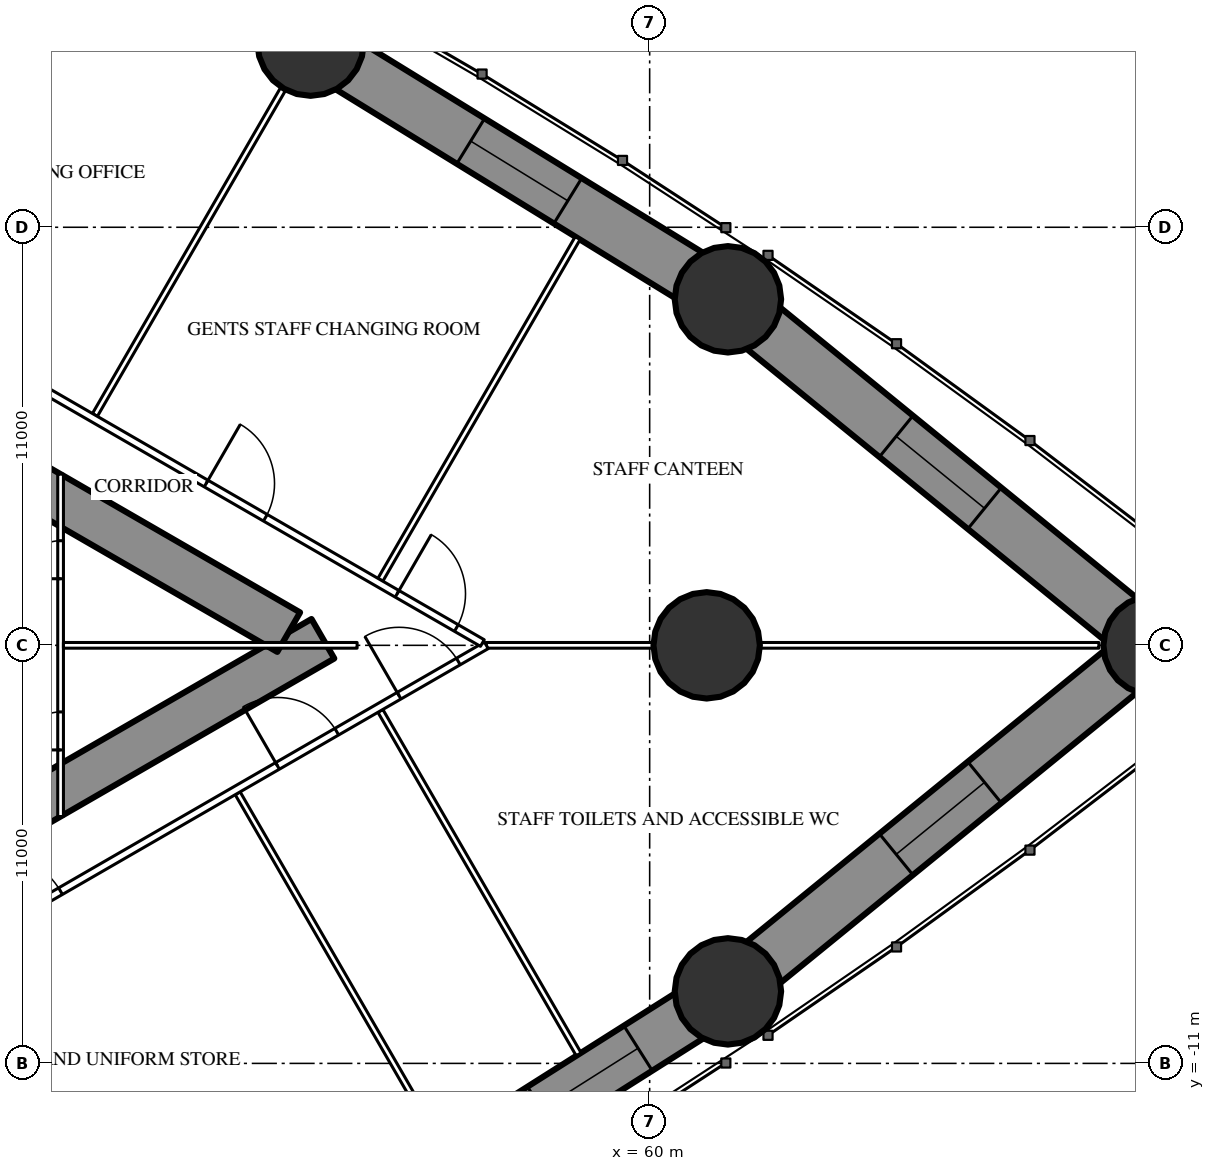
"""IFC4 building model, lengths in metres.
Left out: names, types, materials, properties, quantities, classifications, styles, units other than length and angle.
Written with IfcOpenShell. Run it as: python <this file> out.ifc"""

import sys

from ifc_helpers import new_model, si_unit, direction, frame, frame_2d, origin, origin_2d, place, context, subcontext, project, spatial, rectangle, hollow_circle, extrude, element, fill, save


model = new_model("IFC4")
c1 = context("Model", 3, precision=1e-05, world=origin(), true_north=direction((0.0, 1.0)))
c2 = subcontext(c1, "Body", "Model", "MODEL_VIEW")
j1 = project(units=[si_unit("LENGTHUNIT", "METRE"), si_unit("PLANEANGLEUNIT", "RADIAN")], contexts=[c1])
p1 = place(None, origin())
s1 = spatial("IfcSite", under=j1, at=p1, CompositionType="ELEMENT")
p2 = place(p1, origin())
s2 = spatial("IfcBuilding", under=s1, at=p2, CompositionType="ELEMENT")
p3 = place(p2, frame((0.0, 0.0, 77.5)))
s3 = spatial("IfcBuildingStorey", under=s2, at=p3, CompositionType="ELEMENT", Elevation=77.5)
p4 = place(p3, frame((73.239, 0.0, 0.0), z_axis=(0.0, 0.0, 1.0), x_axis=(1.0, 0.0, 0.0)))
e1 = element("IfcColumn", 1, at=p4, inside=s3, PredefinedType="COLUMN", context=c2, shape_type="SweptSolid", body=[
    extrude(hollow_circle(Radius=1.3, WallThickness=0.1, at=origin_2d()), origin(), (0.0, 0.0, 1.0), 3.5),
])
for number, where, z_axis, x_axis in (
    (2, (62.059, 9.105, 0.0), (0.0, 0.0, 1.0), (1.0, 0.0, 0.0)),
    (3, (51.078, 15.858, 0.0), (0.0, 0.0, 1.0), (1.0, 0.0, 0.0)),
    (4, (62.059, -9.105, 0.0), (0.0, 0.0, 1.0), (1.0, 0.0, 0.0)),
):
    element("IfcColumn", number, at=place(p3, frame(where, z_axis=z_axis, x_axis=x_axis)), inside=s3, PredefinedType="COLUMN", context=c2, shape_type="SweptSolid", body=[
        extrude(hollow_circle(Radius=1.4, WallThickness=0.12, at=origin_2d()), origin(), (0.0, 0.0, 1.0), 3.5),
    ])
p5 = place(p3, frame((61.5, 0.0, 0.0), z_axis=(0.0, 0.0, 1.0), x_axis=(1.0, 0.0, 0.0)))
e5 = element("IfcColumn", 5, at=p5, inside=s3, PredefinedType="COLUMN", context=c2, shape_type="SweptSolid", body=[
    extrude(hollow_circle(Radius=1.4, WallThickness=0.1, at=origin_2d()), origin(), (0.0, 0.0, 1.0), 3.5),
])
p6 = place(p3, frame((27.2, -13.8, 0.0), z_axis=(0.0, 0.0, 1.0), x_axis=(0.866027159892, 0.499996958321, 0.0)))
e6 = element("IfcWall", 6, at=p6, inside=s3, PredefinedType="SHEAR", context=c2, shape_type="SweptSolid", body=[
    extrude(rectangle(XDim=27.947, YDim=1.2, at=frame_2d((13.973, 0.0))), origin(), (0.0, 0.0, 1.0), 3.5),
])
p7 = place(p6, frame((5.65, 0.0, 0.0)))
e7 = element("IfcOpeningElement", 7, at=p7, cuts=e6, PredefinedType="OPENING", context=c2, shape_type="SweptSolid", body=[
    extrude(rectangle(XDim=1.0, YDim=2.2, at=frame_2d((0.5, 1.1))), frame((0.0, 0.61, 0.0), z_axis=(0.0, -1.0, 0.0), x_axis=(1.0, 0.0, 0.0)), (0.0, 0.0, 1.0), 1.22),
])
p8 = place(p6, frame((14.045, 0.0, 0.0)))
e8 = element("IfcOpeningElement", 8, at=p8, cuts=e6, PredefinedType="OPENING", context=c2, shape_type="SweptSolid", body=[
    extrude(rectangle(XDim=1.8, YDim=2.2, at=frame_2d((0.9, 1.1))), frame((0.0, 0.61, 0.0), z_axis=(0.0, -1.0, 0.0), x_axis=(1.0, 0.0, 0.0)), (0.0, 0.0, 1.0), 1.22),
])
p9 = place(p3, frame((27.2, 13.8, 0.0), z_axis=(0.0, 0.0, 1.0), x_axis=(0.866024515034, -0.500001539357, 0.0)))
e9 = element("IfcWall", 9, at=p9, inside=s3, PredefinedType="SHEAR", context=c2, shape_type="SweptSolid", body=[
    extrude(rectangle(XDim=26.907, YDim=1.2, at=frame_2d((13.454, 0.0))), origin(), (0.0, 0.0, 1.0), 3.5),
])
p10 = place(p9, frame((4.5, 0.0, 0.0)))
e10 = element("IfcOpeningElement", 10, at=p10, cuts=e9, PredefinedType="OPENING", context=c2, shape_type="SweptSolid", body=[
    extrude(rectangle(XDim=1.0, YDim=2.2, at=frame_2d((0.5, 1.1))), frame((0.0, 0.61, 0.0), z_axis=(0.0, -1.0, 0.0), x_axis=(1.0, 0.0, 0.0)), (0.0, 0.0, 1.0), 1.22),
])
p11 = place(p9, frame((12.545, 0.0, 0.0)))
e11 = element("IfcOpeningElement", 11, at=p11, cuts=e9, PredefinedType="OPENING", context=c2, shape_type="SweptSolid", body=[
    extrude(rectangle(XDim=1.8, YDim=2.2, at=frame_2d((0.9, 1.1))), frame((0.0, 0.61, 0.0), z_axis=(0.0, -1.0, 0.0), x_axis=(1.0, 0.0, 0.0)), (0.0, 0.0, 1.0), 1.22),
])
p12 = place(p3, frame((54.795, -13.701, 0.0), z_axis=(0.0, 0.0, 1.0), x_axis=(0.845078312276, 0.534642540508, 0.0)))
e12 = element("IfcWall", 12, at=p12, inside=s3, PredefinedType="SHEAR", context=c2, shape_type="SweptSolid", body=[
    extrude(rectangle(XDim=8.596, YDim=1.4, at=frame_2d((4.298, 0.0))), origin(), (0.0, 0.0, 1.0), 3.5),
])
p13 = place(p12, frame((2.798, 0.0, 0.6)))
e13 = element("IfcOpeningElement", 13, at=p13, cuts=e12, PredefinedType="OPENING", context=c2, shape_type="SweptSolid", body=[
    extrude(rectangle(XDim=3.0, YDim=1.2, at=frame_2d((1.5, 0.6))), frame((0.0, 0.71, 0.0), z_axis=(0.0, -1.0, 0.0), x_axis=(1.0, 0.0, 0.0)), (0.0, 0.0, 1.0), 1.42),
])
p14 = place(p3, frame((62.059, -9.105, 0.0), z_axis=(0.0, 0.0, 1.0), x_axis=(0.775390970005, 0.631481467372, 0.0)))
e14 = element("IfcWall", 14, at=p14, inside=s3, PredefinedType="SHEAR", context=c2, shape_type="SweptSolid", body=[
    extrude(rectangle(XDim=14.418, YDim=1.4, at=frame_2d((7.209, 0.0))), origin(), (0.0, 0.0, 1.0), 3.5),
])
p15 = place(p14, frame((5.709, 0.0, 0.6)))
e15 = element("IfcOpeningElement", 15, at=p15, cuts=e14, PredefinedType="OPENING", context=c2, shape_type="SweptSolid", body=[
    extrude(rectangle(XDim=3.0, YDim=1.2, at=frame_2d((1.5, 0.6))), frame((0.0, 0.71, 0.0), z_axis=(0.0, -1.0, 0.0), x_axis=(1.0, 0.0, 0.0)), (0.0, 0.0, 1.0), 1.42),
])
p16 = place(p3, frame((73.239, 0.0, 0.0), z_axis=(0.0, 0.0, 1.0), x_axis=(-0.775390970005, 0.631481467372, 0.0)))
e16 = element("IfcWall", 16, at=p16, inside=s3, PredefinedType="SHEAR", context=c2, shape_type="SweptSolid", body=[
    extrude(rectangle(XDim=14.418, YDim=1.4, at=frame_2d((7.209, 0.0))), origin(), (0.0, 0.0, 1.0), 3.5),
])
p17 = place(p16, frame((5.709, 0.0, 0.6)))
e17 = element("IfcOpeningElement", 17, at=p17, cuts=e16, PredefinedType="OPENING", context=c2, shape_type="SweptSolid", body=[
    extrude(rectangle(XDim=3.0, YDim=1.2, at=frame_2d((1.5, 0.6))), frame((0.0, 0.71, 0.0), z_axis=(0.0, -1.0, 0.0), x_axis=(1.0, 0.0, 0.0)), (0.0, 0.0, 1.0), 1.42),
])
p18 = place(p3, frame((62.059, 9.105, 0.0), z_axis=(0.0, 0.0, 1.0), x_axis=(-0.851815628025, 0.523841708775, 0.0)))
e18 = element("IfcWall", 18, at=p18, inside=s3, PredefinedType="SHEAR", context=c2, shape_type="SweptSolid", body=[
    extrude(rectangle(XDim=12.892, YDim=1.4, at=frame_2d((6.446, 0.0))), origin(), (0.0, 0.0, 1.0), 3.5),
])
p19 = place(p18, frame((4.946, 0.0, 0.6)))
e19 = element("IfcOpeningElement", 19, at=p19, cuts=e18, PredefinedType="OPENING", context=c2, shape_type="SweptSolid", body=[
    extrude(rectangle(XDim=3.0, YDim=1.2, at=frame_2d((1.5, 0.6))), frame((0.0, 0.71, 0.0), z_axis=(0.0, -1.0, 0.0), x_axis=(1.0, 0.0, 0.0)), (0.0, 0.0, 1.0), 1.42),
])
p20 = place(p3, frame((51.078, 15.858, 0.0), z_axis=(0.0, 0.0, 1.0), x_axis=(-0.883403493655, 0.46861313191, 0.0)))
e20 = element("IfcWall", 20, at=p20, inside=s3, PredefinedType="SHEAR", context=c2, shape_type="SweptSolid", body=[
    extrude(rectangle(XDim=8.596, YDim=1.4, at=frame_2d((4.298, 0.0))), origin(), (0.0, 0.0, 1.0), 3.5),
])
p21 = place(p20, frame((2.798, 0.0, 0.6)))
e21 = element("IfcOpeningElement", 21, at=p21, cuts=e20, PredefinedType="OPENING", context=c2, shape_type="SweptSolid", body=[
    extrude(rectangle(XDim=3.0, YDim=1.2, at=frame_2d((1.5, 0.6))), frame((0.0, 0.71, 0.0), z_axis=(0.0, -1.0, 0.0), x_axis=(1.0, 0.0, 0.0)), (0.0, 0.0, 1.0), 1.42),
])
p22 = place(p3, frame((49.159, -3.893, 0.0), z_axis=(0.0, 0.0, 1.0), x_axis=(0.499998773722, -0.866026111775, 0.0)))
e22 = element("IfcWall", 22, at=p22, inside=s3, PredefinedType="PARTITIONING", context=c2, shape_type="SweptSolid", body=[
    extrude(rectangle(XDim=9.892, YDim=0.15, at=frame_2d((4.946, 0.0))), origin(), (0.0, 0.0, 1.0), 2.05),
])
p23 = place(p3, frame((52.915, -1.725, 0.0), z_axis=(0.0, 0.0, 1.0), x_axis=(0.499991830914, -0.866030120157, 0.0)))
e23 = element("IfcWall", 23, at=p23, inside=s3, PredefinedType="PARTITIONING", context=c2, shape_type="SweptSolid", body=[
    extrude(rectangle(XDim=10.434, YDim=0.15, at=frame_2d((5.217, 0.0))), origin(), (0.0, 0.0, 1.0), 3.25),
])
p24 = place(p3, frame((45.403, 6.062, 0.0), z_axis=(0.0, 0.0, 1.0), x_axis=(0.500013434677, 0.866017647131, 0.0)))
e24 = element("IfcWall", 24, at=p24, inside=s3, PredefinedType="PARTITIONING", context=c2, shape_type="SweptSolid", body=[
    extrude(rectangle(XDim=9.902, YDim=0.15, at=frame_2d((4.951, 0.0))), origin(), (0.0, 0.0, 1.0), 2.05),
])
p25 = place(p3, frame((52.915, 1.725, 0.0), z_axis=(0.0, 0.0, 1.0), x_axis=(0.499986436127, 0.866033234748, 0.0)))
e25 = element("IfcWall", 25, at=p25, inside=s3, PredefinedType="PARTITIONING", context=c2, shape_type="SweptSolid", body=[
    extrude(rectangle(XDim=10.381, YDim=0.15, at=frame_2d((5.19, 0.0))), origin(), (0.0, 0.0, 1.0), 3.25),
])
p26 = place(p3, frame((55.702, 0.0, 0.0), z_axis=(0.0, 0.0, 1.0), x_axis=(1.0, 0.0, 0.0)))
e26 = element("IfcWall", 26, at=p26, inside=s3, PredefinedType="PARTITIONING", context=c2, shape_type="SweptSolid", body=[
    extrude(rectangle(XDim=16.117, YDim=0.15, at=frame_2d((8.059, 0.0))), origin(), (0.0, 0.0, 1.0), 2.05),
])
p27 = place(p3, frame((37.96, -10.243, 0.0), z_axis=(0.0, 0.0, 1.0), x_axis=(0.866026429433, 0.499998223521, 0.0)))
e27 = element("IfcWall", 27, at=p27, inside=s3, PredefinedType="PARTITIONING", context=c2, shape_type="SweptSolid", body=[
    extrude(rectangle(XDim=20.487, YDim=0.2, at=frame_2d((10.243, 0.0))), origin(), (0.0, 0.0, 1.0), 3.25),
])
p28 = place(p27, frame((14.142, 0.0, 0.0)))
e28 = element("IfcOpeningElement", 28, at=p28, cuts=e27, PredefinedType="OPENING", context=c2, shape_type="SweptSolid", body=[
    extrude(rectangle(XDim=1.8, YDim=2.2, at=frame_2d((0.9, 1.1))), frame((0.0, 0.11, 0.0), z_axis=(0.0, -1.0, 0.0), x_axis=(1.0, 0.0, 0.0)), (0.0, 0.0, 1.0), 0.22),
])
p29 = place(p27, frame((17.836, 0.0, 0.0)))
e29 = element("IfcOpeningElement", 29, at=p29, cuts=e27, PredefinedType="OPENING", context=c2, shape_type="SweptSolid", body=[
    extrude(rectangle(XDim=1.8, YDim=2.04, at=frame_2d((0.9, 1.02))), frame((0.0, 0.11, 0.0), z_axis=(0.0, -1.0, 0.0), x_axis=(1.0, 0.0, 0.0)), (0.0, 0.0, 1.0), 0.22),
])
p30 = place(p27, frame((5.55, 0.0, 0.0)))
e30 = element("IfcOpeningElement", 30, at=p30, cuts=e27, PredefinedType="OPENING", context=c2, shape_type="SweptSolid", body=[
    extrude(rectangle(XDim=2.0, YDim=2.4, at=frame_2d((1.0, 1.2))), frame((0.0, 0.11, 0.0), z_axis=(0.0, -1.0, 0.0), x_axis=(1.0, 0.0, 0.0)), (0.0, 0.0, 1.0), 0.22),
])
p31 = place(p3, frame((36.834, 10.894, 0.0), z_axis=(0.0, 0.0, 1.0), x_axis=(0.866028157229, -0.499995230863, 0.0)))
e31 = element("IfcWall", 31, at=p31, inside=s3, PredefinedType="PARTITIONING", context=c2, shape_type="SweptSolid", body=[
    extrude(rectangle(XDim=21.667, YDim=0.2, at=frame_2d((10.833, 0.0))), origin(), (0.0, 0.0, 1.0), 3.25),
])
p32 = place(p31, frame((19.076, 0.0, 0.0)))
e32 = element("IfcOpeningElement", 32, at=p32, cuts=e31, PredefinedType="OPENING", context=c2, shape_type="SweptSolid", body=[
    extrude(rectangle(XDim=1.8, YDim=2.04, at=frame_2d((0.9, 1.02))), frame((0.0, 0.11, 0.0), z_axis=(0.0, -1.0, 0.0), x_axis=(1.0, 0.0, 0.0)), (0.0, 0.0, 1.0), 0.22),
])
p33 = place(p31, frame((13.274, 0.0, 0.0)))
e33 = element("IfcOpeningElement", 33, at=p33, cuts=e31, PredefinedType="OPENING", context=c2, shape_type="SweptSolid", body=[
    extrude(rectangle(XDim=1.8, YDim=2.2, at=frame_2d((0.9, 1.1))), frame((0.0, 0.11, 0.0), z_axis=(0.0, -1.0, 0.0), x_axis=(1.0, 0.0, 0.0)), (0.0, 0.0, 1.0), 0.22),
])
p34 = place(p31, frame((4.602, 0.0, 0.0)))
e34 = element("IfcOpeningElement", 34, at=p34, cuts=e31, PredefinedType="OPENING", context=c2, shape_type="SweptSolid", body=[
    extrude(rectangle(XDim=1.8, YDim=2.2, at=frame_2d((0.9, 1.1))), frame((0.0, 0.11, 0.0), z_axis=(0.0, -1.0, 0.0), x_axis=(1.0, 0.0, 0.0)), (0.0, 0.0, 1.0), 0.22),
])
p35 = place(p3, frame((44.5, -4.505, 0.0), z_axis=(0.0, 0.0, 1.0), x_axis=(0.0, 1.0, 0.0)))
e35 = element("IfcWall", 35, at=p35, inside=s3, PredefinedType="PARTITIONING", context=c2, shape_type="SweptSolid", body=[
    extrude(rectangle(XDim=9.009, YDim=0.15, at=frame_2d((4.505, 0.0))), origin(), (0.0, 0.0, 1.0), 3.25),
])
p36 = place(p35, frame((1.752, 0.0, 0.0)))
e36 = element("IfcOpeningElement", 36, at=p36, cuts=e35, PredefinedType="OPENING", context=c2, shape_type="SweptSolid", body=[
    extrude(rectangle(XDim=1.0, YDim=2.2, at=frame_2d((0.5, 1.1))), frame((0.0, 0.085, 0.0), z_axis=(0.0, -1.0, 0.0), x_axis=(1.0, 0.0, 0.0)), (0.0, 0.0, 1.0), 0.17),
])
p37 = place(p35, frame((6.257, 0.0, 0.0)))
e37 = element("IfcOpeningElement", 37, at=p37, cuts=e35, PredefinedType="OPENING", context=c2, shape_type="SweptSolid", body=[
    extrude(rectangle(XDim=1.0, YDim=2.2, at=frame_2d((0.5, 1.1))), frame((0.0, 0.085, 0.0), z_axis=(0.0, -1.0, 0.0), x_axis=(1.0, 0.0, 0.0)), (0.0, 0.0, 1.0), 0.17),
])
p38 = place(p3, frame((44.575, 0.0, 0.0), z_axis=(0.0, 0.0, 1.0), x_axis=(1.0, 0.0, 0.0)))
e38 = element("IfcWall", 38, at=p38, inside=s3, PredefinedType="PARTITIONING", context=c2, shape_type="SweptSolid", body=[
    extrude(rectangle(XDim=7.727, YDim=0.15, at=frame_2d((3.864, 0.0))), origin(), (0.0, 0.0, 1.0), 2.05),
])
p39 = place(p13, origin())
e39 = element("IfcWindow", 39, at=p39, inside=s3, PartitioningType="SINGLE_PANEL", PredefinedType="WINDOW", context=c2, shape_type="SweptSolid", body=[
    extrude(rectangle(XDim=3.0, YDim=1.2, at=frame_2d((1.5, 0.6))), frame((0.0, 0.03, 0.0), z_axis=(0.0, -1.0, 0.0), x_axis=(1.0, 0.0, 0.0)), (0.0, 0.0, 1.0), 0.06),
])
fill(e13, e39)
p40 = place(p15, origin())
e40 = element("IfcWindow", 40, at=p40, inside=s3, PartitioningType="SINGLE_PANEL", PredefinedType="WINDOW", context=c2, shape_type="SweptSolid", body=[
    extrude(rectangle(XDim=3.0, YDim=1.2, at=frame_2d((1.5, 0.6))), frame((0.0, 0.03, 0.0), z_axis=(0.0, -1.0, 0.0), x_axis=(1.0, 0.0, 0.0)), (0.0, 0.0, 1.0), 0.06),
])
fill(e15, e40)
p41 = place(p17, origin())
e41 = element("IfcWindow", 41, at=p41, inside=s3, PartitioningType="SINGLE_PANEL", PredefinedType="WINDOW", context=c2, shape_type="SweptSolid", body=[
    extrude(rectangle(XDim=3.0, YDim=1.2, at=frame_2d((1.5, 0.6))), frame((0.0, 0.03, 0.0), z_axis=(0.0, -1.0, 0.0), x_axis=(1.0, 0.0, 0.0)), (0.0, 0.0, 1.0), 0.06),
])
fill(e17, e41)
p42 = place(p19, origin())
e42 = element("IfcWindow", 42, at=p42, inside=s3, PartitioningType="SINGLE_PANEL", PredefinedType="WINDOW", context=c2, shape_type="SweptSolid", body=[
    extrude(rectangle(XDim=3.0, YDim=1.2, at=frame_2d((1.5, 0.6))), frame((0.0, 0.03, 0.0), z_axis=(0.0, -1.0, 0.0), x_axis=(1.0, 0.0, 0.0)), (0.0, 0.0, 1.0), 0.06),
])
fill(e19, e42)
p43 = place(p28, origin())
e43 = element("IfcDoor", 43, at=p43, inside=s3, OperationType="DOUBLE_DOOR_SINGLE_SWING", PredefinedType="DOOR", context=c2, shape_type="SweptSolid", body=[
    extrude(rectangle(XDim=1.8, YDim=2.2, at=frame_2d((0.9, 1.1))), frame((0.0, 0.025, 0.0), z_axis=(0.0, -1.0, 0.0), x_axis=(1.0, 0.0, 0.0)), (0.0, 0.0, 1.0), 0.05),
])
fill(e28, e43)
p44 = place(p29, origin())
e44 = element("IfcDoor", 44, at=p44, inside=s3, OperationType="DOUBLE_DOOR_SINGLE_SWING", PredefinedType="DOOR", context=c2, shape_type="SweptSolid", body=[
    extrude(rectangle(XDim=1.8, YDim=2.04, at=frame_2d((0.9, 1.02))), frame((0.0, 0.025, 0.0), z_axis=(0.0, -1.0, 0.0), x_axis=(1.0, 0.0, 0.0)), (0.0, 0.0, 1.0), 0.05),
])
fill(e29, e44)
p45 = place(p32, origin())
e45 = element("IfcDoor", 45, at=p45, inside=s3, OperationType="DOUBLE_DOOR_SINGLE_SWING", PredefinedType="DOOR", context=c2, shape_type="SweptSolid", body=[
    extrude(rectangle(XDim=1.8, YDim=2.04, at=frame_2d((0.9, 1.02))), frame((0.0, 0.025, 0.0), z_axis=(0.0, -1.0, 0.0), x_axis=(1.0, 0.0, 0.0)), (0.0, 0.0, 1.0), 0.05),
])
fill(e32, e45)
p46 = place(p33, origin())
e46 = element("IfcDoor", 46, at=p46, inside=s3, OperationType="DOUBLE_DOOR_SINGLE_SWING", PredefinedType="DOOR", context=c2, shape_type="SweptSolid", body=[
    extrude(rectangle(XDim=1.8, YDim=2.2, at=frame_2d((0.9, 1.1))), frame((0.0, 0.025, 0.0), z_axis=(0.0, -1.0, 0.0), x_axis=(1.0, 0.0, 0.0)), (0.0, 0.0, 1.0), 0.05),
])
fill(e33, e46)
p47 = place(p30, origin())
e47 = element("IfcDoor", 47, at=p47, inside=s3, OperationType="DOUBLE_DOOR_SINGLE_SWING", PredefinedType="DOOR", context=c2, shape_type="SweptSolid", body=[
    extrude(rectangle(XDim=2.0, YDim=2.4, at=frame_2d((1.0, 1.2))), frame((0.0, 0.025, 0.0), z_axis=(0.0, -1.0, 0.0), x_axis=(1.0, 0.0, 0.0)), (0.0, 0.0, 1.0), 0.05),
])
fill(e30, e47)
p48 = place(p36, origin())
e48 = element("IfcDoor", 48, at=p48, inside=s3, OperationType="SINGLE_SWING_LEFT", PredefinedType="DOOR", context=c2, shape_type="SweptSolid", body=[
    extrude(rectangle(XDim=1.0, YDim=2.2, at=frame_2d((0.5, 1.1))), frame((0.0, 0.025, 0.0), z_axis=(0.0, -1.0, 0.0), x_axis=(1.0, 0.0, 0.0)), (0.0, 0.0, 1.0), 0.05),
])
fill(e36, e48)
p49 = place(p37, origin())
e49 = element("IfcDoor", 49, at=p49, inside=s3, OperationType="SINGLE_SWING_LEFT", PredefinedType="DOOR", context=c2, shape_type="SweptSolid", body=[
    extrude(rectangle(XDim=1.0, YDim=2.2, at=frame_2d((0.5, 1.1))), frame((0.0, 0.025, 0.0), z_axis=(0.0, -1.0, 0.0), x_axis=(1.0, 0.0, 0.0)), (0.0, 0.0, 1.0), 0.05),
])
fill(e37, e49)
save(model, sys.argv[1])
